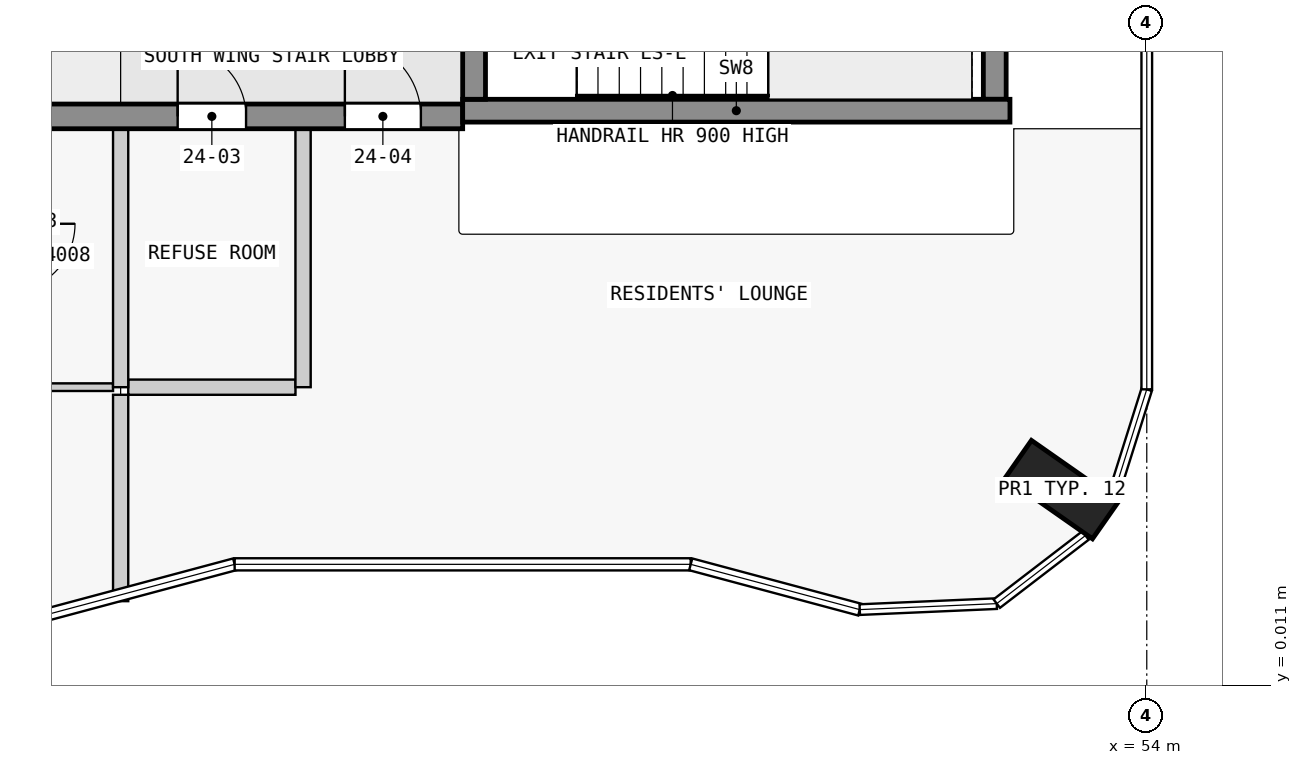
"""IFC4 building model, lengths in metres.
Left out: names, types, materials, properties, quantities, classifications, styles, units other than length and angle.
Written with IfcOpenShell. Run it as: python <this file> out.ifc"""

import sys

from ifc_helpers import new_model, si_unit, direction, frame, frame_2d, origin, origin_2d, place, context, subcontext, project, spatial, rectangle, extrude, element, fill, save


model = new_model("IFC4")
c1 = context("Model", 3, precision=1e-05, world=origin(), true_north=direction((0.0, 1.0)))
c2 = subcontext(c1, "Body", "Model", "MODEL_VIEW")
j1 = project(units=[si_unit("LENGTHUNIT", "METRE"), si_unit("PLANEANGLEUNIT", "RADIAN")], contexts=[c1])
p1 = place(None, origin())
s1 = spatial("IfcSite", under=j1, at=p1, CompositionType="ELEMENT")
p2 = place(p1, origin())
s2 = spatial("IfcBuilding", under=s1, at=p2, CompositionType="ELEMENT")
p3 = place(p2, frame((0.0, 0.0, 95.8)))
s3 = spatial("IfcBuildingStorey", under=s2, at=p3, CompositionType="ELEMENT", Elevation=95.8)
p4 = place(p3, frame((52.884, 2.59, 0.0), z_axis=(0.0, 0.0, 1.0), x_axis=(0.573542637991, 0.819175709117, 0.0)))
e1 = element("IfcColumn", 1, at=p4, inside=s3, PredefinedType="COLUMN", context=c2, shape_type="SweptSolid", body=[
    extrude(rectangle(XDim=0.6, YDim=1.4, at=origin_2d()), origin(), (0.0, 0.0, 1.0), 3.5),
])
p5 = place(p3, frame((45.15, 7.725, 0.0), z_axis=(0.0, 0.0, 1.0), x_axis=(0.0, 1.0, 0.0)))
e2 = element("IfcWall", 2, at=p5, inside=s3, PredefinedType="SHEAR", context=c2, shape_type="SweptSolid", body=[
    extrude(rectangle(XDim=2.55, YDim=0.3, at=frame_2d((1.275, 0.0))), origin(), (0.0, 0.0, 1.0), 3.5),
])
p6 = place(p5, frame((0.725, 0.0, 0.0)))
e3 = element("IfcOpeningElement", 3, at=p6, cuts=e2, PredefinedType="OPENING", context=c2, shape_type="SweptSolid", body=[
    extrude(rectangle(XDim=1.1, YDim=2.1, at=frame_2d((0.55, 1.05))), frame((0.0, 0.16, 0.0), z_axis=(0.0, -1.0, 0.0), x_axis=(1.0, 0.0, 0.0)), (0.0, 0.0, 1.0), 0.32),
])
p7 = place(p3, frame((52.0, 7.725, 0.0), z_axis=(0.0, 0.0, 1.0), x_axis=(0.0, 1.0, 0.0)))
e4 = element("IfcWall", 4, at=p7, inside=s3, PredefinedType="SHEAR", context=c2, shape_type="SweptSolid", body=[
    extrude(rectangle(XDim=2.55, YDim=0.3, at=frame_2d((1.275, 0.0))), origin(), (0.0, 0.0, 1.0), 3.5),
])
p8 = place(p3, frame((45.0, 7.575, 0.0), z_axis=(0.0, 0.0, 1.0), x_axis=(1.0, 0.0, 0.0)))
e5 = element("IfcWall", 5, at=p8, inside=s3, PredefinedType="SHEAR", context=c2, shape_type="SweptSolid", body=[
    extrude(rectangle(XDim=7.2, YDim=0.3, at=frame_2d((3.6, 0.0))), origin(), (0.0, 0.0, 1.0), 3.5),
])
p9 = place(p3, frame((22.5, 7.5, 0.0), z_axis=(0.0, 0.0, 1.0), x_axis=(1.0, 0.0, 0.0)))
e6 = element("IfcWall", 6, at=p9, inside=s3, PredefinedType="SHEAR", context=c2, shape_type="SweptSolid", body=[
    extrude(rectangle(XDim=22.5, YDim=0.325, at=frame_2d((11.25, 0.0))), origin(), (0.0, 0.0, 1.0), 3.25),
])
p10 = place(p9, frame((5.65, 0.0, 0.0)))
e7 = element("IfcOpeningElement", 7, at=p10, cuts=e6, PredefinedType="OPENING", context=c2, shape_type="SweptSolid", body=[
    extrude(rectangle(XDim=1.0, YDim=2.1, at=frame_2d((0.5, 1.05))), frame((0.0, 0.172, 0.0), z_axis=(0.0, -1.0, 0.0), x_axis=(1.0, 0.0, 0.0)), (0.0, 0.0, 1.0), 0.345),
])
p11 = place(p9, frame((15.25, 0.0, 0.0)))
e8 = element("IfcOpeningElement", 8, at=p11, cuts=e6, PredefinedType="OPENING", context=c2, shape_type="SweptSolid", body=[
    extrude(rectangle(XDim=1.0, YDim=2.1, at=frame_2d((0.5, 1.05))), frame((0.0, 0.172, 0.0), z_axis=(0.0, -1.0, 0.0), x_axis=(1.0, 0.0, 0.0)), (0.0, 0.0, 1.0), 0.345),
])
p12 = place(p9, frame((18.75, 0.0, 0.0)))
e9 = element("IfcOpeningElement", 9, at=p12, cuts=e6, PredefinedType="OPENING", context=c2, shape_type="SweptSolid", body=[
    extrude(rectangle(XDim=0.9, YDim=2.1, at=frame_2d((0.45, 1.05))), frame((0.0, 0.172, 0.0), z_axis=(0.0, -1.0, 0.0), x_axis=(1.0, 0.0, 0.0)), (0.0, 0.0, 1.0), 0.345),
])
p13 = place(p9, frame((20.95, 0.0, 0.0)))
e10 = element("IfcOpeningElement", 10, at=p13, cuts=e6, PredefinedType="OPENING", context=c2, shape_type="SweptSolid", body=[
    extrude(rectangle(XDim=1.0, YDim=2.1, at=frame_2d((0.5, 1.05))), frame((0.0, 0.172, 0.0), z_axis=(0.0, -1.0, 0.0), x_axis=(1.0, 0.0, 0.0)), (0.0, 0.0, 1.0), 0.345),
])
p14 = place(p3, frame((39.05, 3.938, 0.0), z_axis=(0.0, 0.0, 1.0), x_axis=(1.0, 0.0, 0.0)))
e11 = element("IfcWall", 11, at=p14, inside=s3, PredefinedType="PARTITIONING", context=c2, shape_type="SweptSolid", body=[
    extrude(rectangle(XDim=1.35, YDim=0.1, at=frame_2d((0.675, 0.0))), origin(), (0.0, 0.0, 1.0), 3.25),
])
p15 = place(p3, frame((40.6, 3.938, 0.0), z_axis=(0.0, 0.0, 1.0), x_axis=(1.0, 0.0, 0.0)))
e12 = element("IfcWall", 12, at=p15, inside=s3, PredefinedType="PARTITIONING", context=c2, shape_type="SweptSolid", body=[
    extrude(rectangle(XDim=2.2, YDim=0.2, at=frame_2d((1.1, 0.0))), origin(), (0.0, 0.0, 1.0), 3.25),
])
p16 = place(p3, frame((40.5, 3.837, 0.0), z_axis=(0.0, 0.0, 1.0), x_axis=(0.0, -1.0, 0.0)))
e13 = element("IfcWall", 13, at=p16, inside=s3, PredefinedType="PARTITIONING", context=c2, shape_type="SweptSolid", body=[
    extrude(rectangle(XDim=2.715, YDim=0.2, at=frame_2d((1.357, 0.0))), origin(), (0.0, 0.0, 1.0), 3.25),
])
for number, where, z_axis, x_axis in (
    (14, (40.5, 3.938, 0.0), (0.0, 0.0, 1.0), (0.0, 1.0, 0.0)),
    (15, (42.9, 3.938, 0.0), (0.0, 0.0, 1.0), (0.0, 1.0, 0.0)),
):
    element("IfcWall", number, at=place(p3, frame(where, z_axis=z_axis, x_axis=x_axis)), inside=s3, PredefinedType="PARTITIONING", context=c2, shape_type="SweptSolid", body=[
        extrude(rectangle(XDim=3.4, YDim=0.2, at=frame_2d((1.7, 0.0))), origin(), (0.0, 0.0, 1.0), 3.25),
    ])
p17 = place(p12, origin())
e16 = element("IfcDoor", 16, at=p17, inside=s3, OperationType="SINGLE_SWING_RIGHT", PredefinedType="DOOR", context=c2, shape_type="SweptSolid", body=[
    extrude(rectangle(XDim=0.9, YDim=2.1, at=frame_2d((0.45, 1.05))), frame((0.0, 0.025, 0.0), z_axis=(0.0, -1.0, 0.0), x_axis=(1.0, 0.0, 0.0)), (0.0, 0.0, 1.0), 0.05),
])
fill(e9, e16)
p18 = place(p13, origin())
e17 = element("IfcDoor", 17, at=p18, inside=s3, OperationType="SINGLE_SWING_RIGHT", PredefinedType="DOOR", context=c2, shape_type="SweptSolid", body=[
    extrude(rectangle(XDim=1.0, YDim=2.1, at=frame_2d((0.5, 1.05))), frame((0.0, 0.025, 0.0), z_axis=(0.0, -1.0, 0.0), x_axis=(1.0, 0.0, 0.0)), (0.0, 0.0, 1.0), 0.05),
])
fill(e10, e17)
save(model, sys.argv[1])
